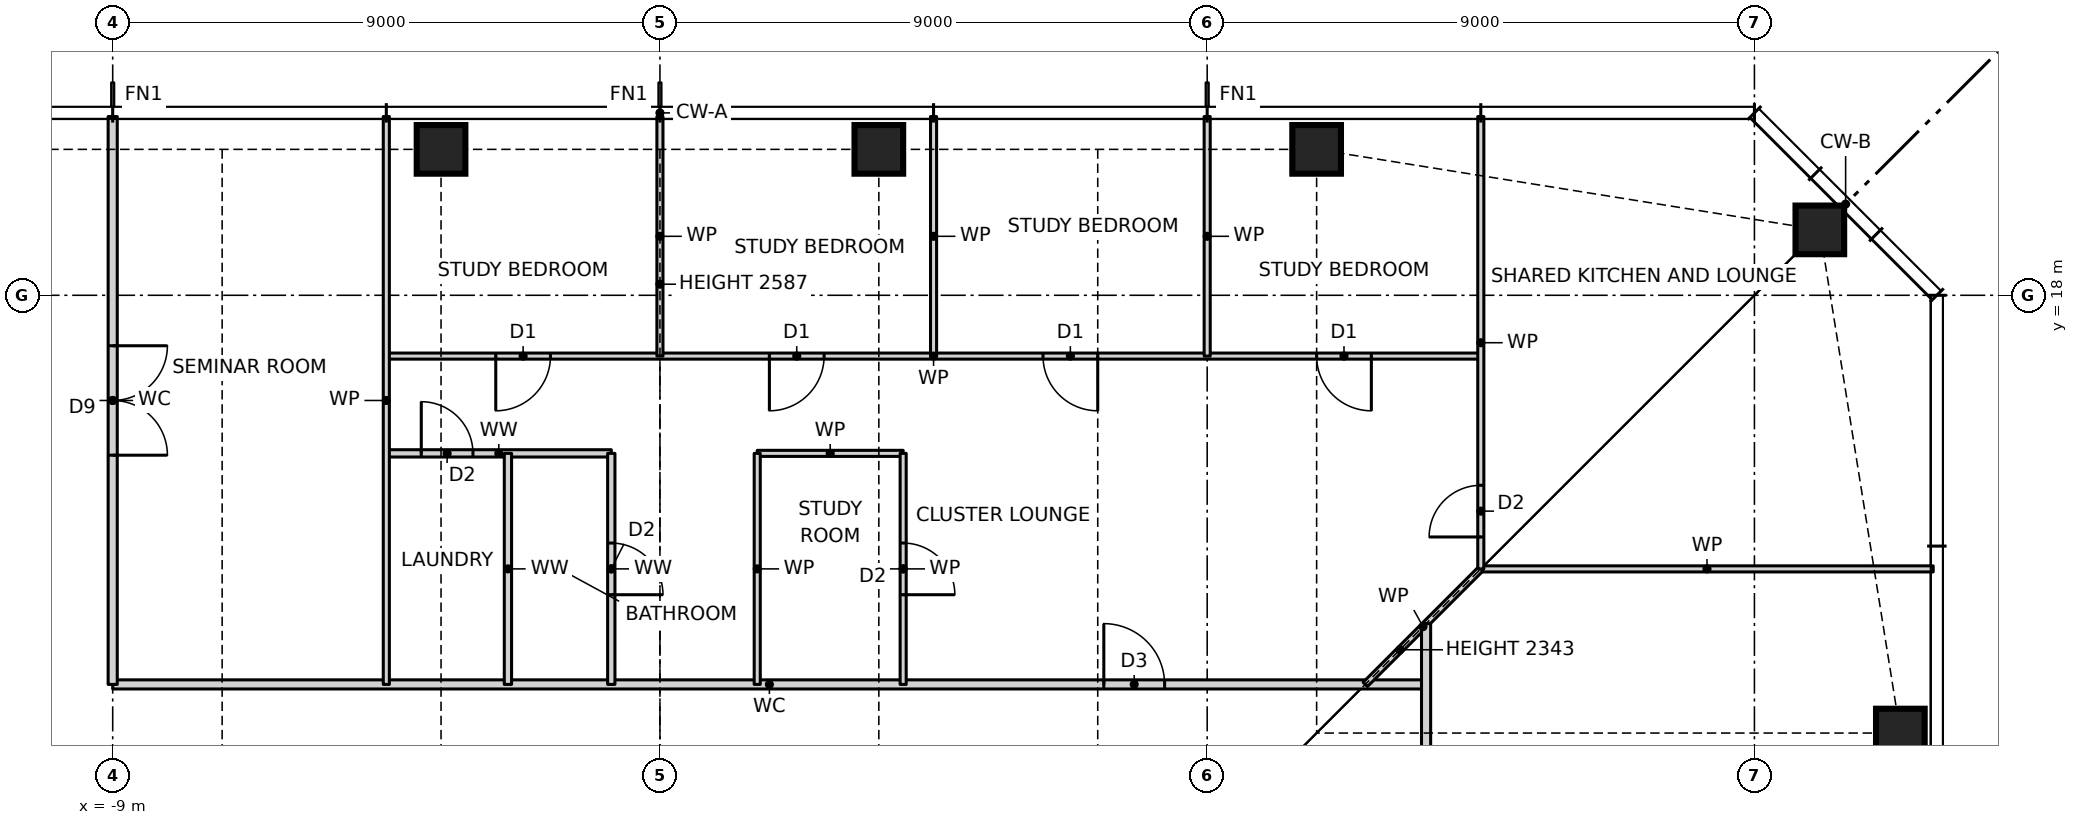
"""IFC4 building model, lengths in metres.
Left out: names, types, materials, properties, quantities, classifications, styles, units other than length and angle.
Written with IfcOpenShell. Run it as: python <this file> out.ifc"""

import sys

from ifc_helpers import new_model, si_unit, direction, frame, frame_2d, origin, origin_2d, place, context, subcontext, project, spatial, rectangle, hollow_rectangle, extrude, element, fill, save


model = new_model("IFC4")
c1 = context("Model", 3, precision=1e-05, world=origin(), true_north=direction((0.0, 1.0)))
c2 = subcontext(c1, "Body", "Model", "MODEL_VIEW")
j1 = project(units=[si_unit("LENGTHUNIT", "METRE"), si_unit("PLANEANGLEUNIT", "RADIAN")], contexts=[c1])
p1 = place(None, origin())
s1 = spatial("IfcSite", under=j1, at=p1, CompositionType="ELEMENT")
p2 = place(p1, origin())
s2 = spatial("IfcBuilding", under=s1, at=p2, CompositionType="ELEMENT")
p3 = place(p2, frame((0.0, 0.0, 98.0)))
s3 = spatial("IfcBuildingStorey", under=s2, at=p3, CompositionType="ELEMENT", Elevation=98.0)
for number, where, z_axis, x_axis in (
    (1, (20.4, 10.8, 0.0), (0.0, 0.0, 1.0), (1.0, 0.0, 0.0)),
    (2, (19.076, 19.076, 0.0), (0.0, 0.0, 1.0), (1.0, 0.0, 0.0)),
    (3, (10.8, 20.4, 0.0), (0.0, 0.0, 1.0), (1.0, 0.0, 0.0)),
    (4, (3.6, 20.4, 0.0), (0.0, 0.0, 1.0), (1.0, 0.0, 0.0)),
    (5, (-3.6, 20.4, 0.0), (0.0, 0.0, 1.0), (1.0, 0.0, 0.0)),
):
    element("IfcColumn", number, at=place(p3, frame(where, z_axis=z_axis, x_axis=x_axis)), inside=s3, PredefinedType="COLUMN", context=c2, shape_type="SweptSolid", body=[
        extrude(hollow_rectangle(XDim=0.8, YDim=0.8, WallThickness=0.07, at=origin_2d()), origin(), (0.0, 0.0, 1.0), 3.5),
    ])
p4 = place(p3, frame((-9.0, 11.6, 0.0), z_axis=(0.0, 0.0, 1.0), x_axis=(1.0, 0.0, 0.0)))
e6 = element("IfcWall", 6, at=p4, inside=s3, PredefinedType="PARTITIONING", context=c2, shape_type="SweptSolid", body=[
    extrude(rectangle(XDim=21.6, YDim=0.15, at=frame_2d((10.8, 0.0))), origin(), (0.0, 0.0, 1.0), 3.27),
])
p5 = place(p4, frame((16.3, 0.0, 0.0)))
e7 = element("IfcOpeningElement", 7, at=p5, cuts=e6, PredefinedType="OPENING", context=c2, shape_type="SweptSolid", body=[
    extrude(rectangle(XDim=1.0, YDim=2.1, at=frame_2d((0.5, 1.05))), frame((0.0, 0.085, 0.0), z_axis=(0.0, -1.0, 0.0), x_axis=(1.0, 0.0, 0.0)), (0.0, 0.0, 1.0), 0.17),
])
p6 = place(p3, frame((13.5, 13.5, 0.0), z_axis=(0.0, 0.0, 1.0), x_axis=(1.0, 0.0, 0.0)))
e8 = element("IfcWall", 8, at=p6, inside=s3, PredefinedType="PARTITIONING", context=c2, shape_type="SweptSolid", body=[
    extrude(rectangle(XDim=7.44, YDim=0.1, at=frame_2d((3.72, 0.0))), origin(), (0.0, 0.0, 1.0), 3.27),
])
p7 = place(p3, frame((-4.5, 15.4, 0.0), z_axis=(0.0, 0.0, 1.0), x_axis=(1.0, 0.0, 0.0)))
e9 = element("IfcWall", 9, at=p7, inside=s3, PredefinedType="PARTITIONING", context=c2, shape_type="SweptSolid", body=[
    extrude(rectangle(XDim=3.7, YDim=0.12, at=frame_2d((1.85, 0.0))), origin(), (0.0, 0.0, 1.0), 3.27),
])
p8 = place(p7, frame((0.575, 0.0, 0.0)))
e10 = element("IfcOpeningElement", 10, at=p8, cuts=e9, PredefinedType="OPENING", context=c2, shape_type="SweptSolid", body=[
    extrude(rectangle(XDim=0.85, YDim=2.1, at=frame_2d((0.425, 1.05))), frame((0.0, 0.07, 0.0), z_axis=(0.0, -1.0, 0.0), x_axis=(1.0, 0.0, 0.0)), (0.0, 0.0, 1.0), 0.14),
])
p9 = place(p3, frame((1.6, 15.4, 0.0), z_axis=(0.0, 0.0, 1.0), x_axis=(1.0, 0.0, 0.0)))
e11 = element("IfcWall", 11, at=p9, inside=s3, PredefinedType="PARTITIONING", context=c2, shape_type="SweptSolid", body=[
    extrude(rectangle(XDim=2.4, YDim=0.1, at=frame_2d((1.2, 0.0))), origin(), (0.0, 0.0, 1.0), 3.27),
])
p10 = place(p3, frame((-4.5, 17.0, 0.0), z_axis=(0.0, 0.0, 1.0), x_axis=(1.0, 0.0, 0.0)))
e12 = element("IfcWall", 12, at=p10, inside=s3, PredefinedType="PARTITIONING", context=c2, shape_type="SweptSolid", body=[
    extrude(rectangle(XDim=18.0, YDim=0.1, at=frame_2d((9.0, 0.0))), origin(), (0.0, 0.0, 1.0), 3.27),
])
p11 = place(p10, frame((15.3, 0.0, 0.0)))
e13 = element("IfcOpeningElement", 13, at=p11, cuts=e12, PredefinedType="OPENING", context=c2, shape_type="SweptSolid", body=[
    extrude(rectangle(XDim=0.9, YDim=2.1, at=frame_2d((0.45, 1.05))), frame((0.0, 0.06, 0.0), z_axis=(0.0, -1.0, 0.0), x_axis=(1.0, 0.0, 0.0)), (0.0, 0.0, 1.0), 0.12),
])
p12 = place(p10, frame((10.8, 0.0, 0.0)))
e14 = element("IfcOpeningElement", 14, at=p12, cuts=e12, PredefinedType="OPENING", context=c2, shape_type="SweptSolid", body=[
    extrude(rectangle(XDim=0.9, YDim=2.1, at=frame_2d((0.45, 1.05))), frame((0.0, 0.06, 0.0), z_axis=(0.0, -1.0, 0.0), x_axis=(1.0, 0.0, 0.0)), (0.0, 0.0, 1.0), 0.12),
])
p13 = place(p10, frame((6.3, 0.0, 0.0)))
e15 = element("IfcOpeningElement", 15, at=p13, cuts=e12, PredefinedType="OPENING", context=c2, shape_type="SweptSolid", body=[
    extrude(rectangle(XDim=0.9, YDim=2.1, at=frame_2d((0.45, 1.05))), frame((0.0, 0.06, 0.0), z_axis=(0.0, -1.0, 0.0), x_axis=(1.0, 0.0, 0.0)), (0.0, 0.0, 1.0), 0.12),
])
p14 = place(p10, frame((1.8, 0.0, 0.0)))
e16 = element("IfcOpeningElement", 16, at=p14, cuts=e12, PredefinedType="OPENING", context=c2, shape_type="SweptSolid", body=[
    extrude(rectangle(XDim=0.9, YDim=2.1, at=frame_2d((0.45, 1.05))), frame((0.0, 0.06, 0.0), z_axis=(0.0, -1.0, 0.0), x_axis=(1.0, 0.0, 0.0)), (0.0, 0.0, 1.0), 0.12),
])
p15 = place(p3, frame((11.6, 11.6, 0.0), z_axis=(0.0, 0.0, 1.0), x_axis=(0.707106781187, 0.707106781187, 0.0)))
e17 = element("IfcWall", 17, at=p15, inside=s3, PredefinedType="PARTITIONING", context=c2, shape_type="SweptSolid", body=[
    extrude(rectangle(XDim=2.687, YDim=0.1, at=frame_2d((1.343, 0.0))), origin(), (0.0, 0.0, 1.0), 2.343),
])
p16 = place(p3, frame((13.5, 13.5, 0.0), z_axis=(0.0, 0.0, 1.0), x_axis=(0.0, 1.0, 0.0)))
e18 = element("IfcWall", 18, at=p16, inside=s3, PredefinedType="PARTITIONING", context=c2, shape_type="SweptSolid", body=[
    extrude(rectangle(XDim=7.44, YDim=0.1, at=frame_2d((3.72, 0.0))), origin(), (0.0, 0.0, 1.0), 3.27),
])
p17 = place(p16, frame((0.525, 0.0, 0.0)))
e19 = element("IfcOpeningElement", 19, at=p17, cuts=e18, PredefinedType="OPENING", context=c2, shape_type="SweptSolid", body=[
    extrude(rectangle(XDim=0.85, YDim=2.1, at=frame_2d((0.425, 1.05))), frame((0.0, 0.06, 0.0), z_axis=(0.0, -1.0, 0.0), x_axis=(1.0, 0.0, 0.0)), (0.0, 0.0, 1.0), 0.12),
])
p18 = place(p3, frame((12.6, -12.6, 0.0), z_axis=(0.0, 0.0, 1.0), x_axis=(0.0, 1.0, 0.0)))
e20 = element("IfcWall", 20, at=p18, inside=s3, PredefinedType="PARTITIONING", context=c2, shape_type="SweptSolid", body=[
    extrude(rectangle(XDim=25.2, YDim=0.15, at=frame_2d((12.6, 0.0))), origin(), (0.0, 0.0, 1.0), 3.27),
])
p19 = place(p18, frame((5.15, 0.0, 0.0)))
e21 = element("IfcOpeningElement", 21, at=p19, cuts=e20, PredefinedType="OPENING", context=c2, shape_type="SweptSolid", body=[
    extrude(rectangle(XDim=1.8, YDim=2.1, at=frame_2d((0.9, 1.05))), frame((0.0, 0.085, 0.0), z_axis=(0.0, -1.0, 0.0), x_axis=(1.0, 0.0, 0.0)), (0.0, 0.0, 1.0), 0.17),
])
p20 = place(p18, frame((11.7, 0.0, 0.0)))
e22 = element("IfcOpeningElement", 22, at=p20, cuts=e20, PredefinedType="OPENING", context=c2, shape_type="SweptSolid", body=[
    extrude(rectangle(XDim=1.8, YDim=2.1, at=frame_2d((0.9, 1.05))), frame((0.0, 0.085, 0.0), z_axis=(0.0, -1.0, 0.0), x_axis=(1.0, 0.0, 0.0)), (0.0, 0.0, 1.0), 0.17),
])
p21 = place(p18, frame((18.25, 0.0, 0.0)))
e23 = element("IfcOpeningElement", 23, at=p21, cuts=e20, PredefinedType="OPENING", context=c2, shape_type="SweptSolid", body=[
    extrude(rectangle(XDim=1.8, YDim=2.1, at=frame_2d((0.9, 1.05))), frame((0.0, 0.085, 0.0), z_axis=(0.0, -1.0, 0.0), x_axis=(1.0, 0.0, 0.0)), (0.0, 0.0, 1.0), 0.17),
])
for number, where, z_axis, x_axis in (
    (24, (9.0, 17.0, 0.0), (0.0, 0.0, 1.0), (0.0, 1.0, 0.0)),
    (25, (4.5, 17.0, 0.0), (0.0, 0.0, 1.0), (0.0, 1.0, 0.0)),
):
    element("IfcWall", number, at=place(p3, frame(where, z_axis=z_axis, x_axis=x_axis)), inside=s3, PredefinedType="PARTITIONING", context=c2, shape_type="SweptSolid", body=[
        extrude(rectangle(XDim=3.94, YDim=0.1, at=frame_2d((1.97, 0.0))), origin(), (0.0, 0.0, 1.0), 3.27),
    ])
p22 = place(p3, frame((4.0, 11.6, 0.0), z_axis=(0.0, 0.0, 1.0), x_axis=(0.0, 1.0, 0.0)))
e26 = element("IfcWall", 26, at=p22, inside=s3, PredefinedType="PARTITIONING", context=c2, shape_type="SweptSolid", body=[
    extrude(rectangle(XDim=3.8, YDim=0.1, at=frame_2d((1.9, 0.0))), origin(), (0.0, 0.0, 1.0), 3.27),
])
p23 = place(p22, frame((1.475, 0.0, 0.0)))
e27 = element("IfcOpeningElement", 27, at=p23, cuts=e26, PredefinedType="OPENING", context=c2, shape_type="SweptSolid", body=[
    extrude(rectangle(XDim=0.85, YDim=2.1, at=frame_2d((0.425, 1.05))), frame((0.0, 0.06, 0.0), z_axis=(0.0, -1.0, 0.0), x_axis=(1.0, 0.0, 0.0)), (0.0, 0.0, 1.0), 0.12),
])
p24 = place(p3, frame((1.6, 11.6, 0.0), z_axis=(0.0, 0.0, 1.0), x_axis=(0.0, 1.0, 0.0)))
e28 = element("IfcWall", 28, at=p24, inside=s3, PredefinedType="PARTITIONING", context=c2, shape_type="SweptSolid", body=[
    extrude(rectangle(XDim=3.8, YDim=0.1, at=frame_2d((1.9, 0.0))), origin(), (0.0, 0.0, 1.0), 3.27),
])
p25 = place(p3, frame((0.0, 17.0, 0.0), z_axis=(0.0, 0.0, 1.0), x_axis=(0.0, 1.0, 0.0)))
e29 = element("IfcWall", 29, at=p25, inside=s3, PredefinedType="PARTITIONING", context=c2, shape_type="SweptSolid", body=[
    extrude(rectangle(XDim=3.94, YDim=0.1, at=frame_2d((1.97, 0.0))), origin(), (0.0, 0.0, 1.0), 2.587),
])
p26 = place(p3, frame((-0.8, 11.6, 0.0), z_axis=(0.0, 0.0, 1.0), x_axis=(0.0, 1.0, 0.0)))
e30 = element("IfcWall", 30, at=p26, inside=s3, PredefinedType="PARTITIONING", context=c2, shape_type="SweptSolid", body=[
    extrude(rectangle(XDim=3.8, YDim=0.12, at=frame_2d((1.9, 0.0))), origin(), (0.0, 0.0, 1.0), 3.27),
])
p27 = place(p26, frame((1.475, 0.0, 0.0)))
e31 = element("IfcOpeningElement", 31, at=p27, cuts=e30, PredefinedType="OPENING", context=c2, shape_type="SweptSolid", body=[
    extrude(rectangle(XDim=0.85, YDim=2.1, at=frame_2d((0.425, 1.05))), frame((0.0, 0.07, 0.0), z_axis=(0.0, -1.0, 0.0), x_axis=(1.0, 0.0, 0.0)), (0.0, 0.0, 1.0), 0.14),
])
p28 = place(p3, frame((-2.5, 11.6, 0.0), z_axis=(0.0, 0.0, 1.0), x_axis=(0.0, 1.0, 0.0)))
e32 = element("IfcWall", 32, at=p28, inside=s3, PredefinedType="PARTITIONING", context=c2, shape_type="SweptSolid", body=[
    extrude(rectangle(XDim=3.8, YDim=0.12, at=frame_2d((1.9, 0.0))), origin(), (0.0, 0.0, 1.0), 3.27),
])
p29 = place(p3, frame((-4.5, 11.6, 0.0), z_axis=(0.0, 0.0, 1.0), x_axis=(0.0, 1.0, 0.0)))
e33 = element("IfcWall", 33, at=p29, inside=s3, PredefinedType="PARTITIONING", context=c2, shape_type="SweptSolid", body=[
    extrude(rectangle(XDim=9.34, YDim=0.1, at=frame_2d((4.67, 0.0))), origin(), (0.0, 0.0, 1.0), 3.27),
])
p30 = place(p3, frame((-9.0, 11.6, 0.0), z_axis=(0.0, 0.0, 1.0), x_axis=(0.0, 1.0, 0.0)))
e34 = element("IfcWall", 34, at=p30, inside=s3, PredefinedType="PARTITIONING", context=c2, shape_type="SweptSolid", body=[
    extrude(rectangle(XDim=9.34, YDim=0.15, at=frame_2d((4.67, 0.0))), origin(), (0.0, 0.0, 1.0), 3.27),
])
p31 = place(p30, frame((3.77, 0.0, 0.0)))
e35 = element("IfcOpeningElement", 35, at=p31, cuts=e34, PredefinedType="OPENING", context=c2, shape_type="SweptSolid", body=[
    extrude(rectangle(XDim=1.8, YDim=2.1, at=frame_2d((0.9, 1.05))), frame((0.0, 0.085, 0.0), z_axis=(0.0, -1.0, 0.0), x_axis=(1.0, 0.0, 0.0)), (0.0, 0.0, 1.0), 0.17),
])
p32 = place(p11, frame((0.9, 0.0, 0.0), z_axis=(0.0, 0.0, 1.0), x_axis=(-1.0, 0.0, 0.0)))
e36 = element("IfcDoor", 36, at=p32, inside=s3, OperationType="SINGLE_SWING_LEFT", PredefinedType="DOOR", context=c2, shape_type="SweptSolid", body=[
    extrude(rectangle(XDim=0.9, YDim=2.1, at=frame_2d((0.45, 1.05))), frame((0.0, 0.025, 0.0), z_axis=(0.0, -1.0, 0.0), x_axis=(1.0, 0.0, 0.0)), (0.0, 0.0, 1.0), 0.05),
])
fill(e13, e36)
p33 = place(p12, frame((0.9, 0.0, 0.0), z_axis=(0.0, 0.0, 1.0), x_axis=(-1.0, 0.0, 0.0)))
e37 = element("IfcDoor", 37, at=p33, inside=s3, OperationType="SINGLE_SWING_LEFT", PredefinedType="DOOR", context=c2, shape_type="SweptSolid", body=[
    extrude(rectangle(XDim=0.9, YDim=2.1, at=frame_2d((0.45, 1.05))), frame((0.0, 0.025, 0.0), z_axis=(0.0, -1.0, 0.0), x_axis=(1.0, 0.0, 0.0)), (0.0, 0.0, 1.0), 0.05),
])
fill(e14, e37)
p34 = place(p13, frame((0.9, 0.0, 0.0), z_axis=(0.0, 0.0, 1.0), x_axis=(-1.0, 0.0, 0.0)))
e38 = element("IfcDoor", 38, at=p34, inside=s3, OperationType="SINGLE_SWING_RIGHT", PredefinedType="DOOR", context=c2, shape_type="SweptSolid", body=[
    extrude(rectangle(XDim=0.9, YDim=2.1, at=frame_2d((0.45, 1.05))), frame((0.0, 0.025, 0.0), z_axis=(0.0, -1.0, 0.0), x_axis=(1.0, 0.0, 0.0)), (0.0, 0.0, 1.0), 0.05),
])
fill(e15, e38)
p35 = place(p14, frame((0.9, 0.0, 0.0), z_axis=(0.0, 0.0, 1.0), x_axis=(-1.0, 0.0, 0.0)))
e39 = element("IfcDoor", 39, at=p35, inside=s3, OperationType="SINGLE_SWING_RIGHT", PredefinedType="DOOR", context=c2, shape_type="SweptSolid", body=[
    extrude(rectangle(XDim=0.9, YDim=2.1, at=frame_2d((0.45, 1.05))), frame((0.0, 0.025, 0.0), z_axis=(0.0, -1.0, 0.0), x_axis=(1.0, 0.0, 0.0)), (0.0, 0.0, 1.0), 0.05),
])
fill(e16, e39)
p36 = place(p5, origin())
e40 = element("IfcDoor", 40, at=p36, inside=s3, OperationType="SINGLE_SWING_LEFT", PredefinedType="DOOR", context=c2, shape_type="SweptSolid", body=[
    extrude(rectangle(XDim=1.0, YDim=2.1, at=frame_2d((0.5, 1.05))), frame((0.0, 0.025, 0.0), z_axis=(0.0, -1.0, 0.0), x_axis=(1.0, 0.0, 0.0)), (0.0, 0.0, 1.0), 0.05),
])
fill(e7, e40)
p37 = place(p23, frame((0.85, 0.0, 0.0), z_axis=(0.0, 0.0, 1.0), x_axis=(-1.0, 0.0, 0.0)))
e41 = element("IfcDoor", 41, at=p37, inside=s3, OperationType="SINGLE_SWING_RIGHT", PredefinedType="DOOR", context=c2, shape_type="SweptSolid", body=[
    extrude(rectangle(XDim=0.85, YDim=2.1, at=frame_2d((0.425, 1.05))), frame((0.0, 0.025, 0.0), z_axis=(0.0, -1.0, 0.0), x_axis=(1.0, 0.0, 0.0)), (0.0, 0.0, 1.0), 0.05),
])
fill(e27, e41)
p38 = place(p27, frame((0.85, 0.0, 0.0), z_axis=(0.0, 0.0, 1.0), x_axis=(-1.0, 0.0, 0.0)))
e42 = element("IfcDoor", 42, at=p38, inside=s3, OperationType="SINGLE_SWING_RIGHT", PredefinedType="DOOR", context=c2, shape_type="SweptSolid", body=[
    extrude(rectangle(XDim=0.85, YDim=2.1, at=frame_2d((0.425, 1.05))), frame((0.0, 0.025, 0.0), z_axis=(0.0, -1.0, 0.0), x_axis=(1.0, 0.0, 0.0)), (0.0, 0.0, 1.0), 0.05),
])
fill(e31, e42)
p39 = place(p8, origin())
e43 = element("IfcDoor", 43, at=p39, inside=s3, OperationType="SINGLE_SWING_LEFT", PredefinedType="DOOR", context=c2, shape_type="SweptSolid", body=[
    extrude(rectangle(XDim=0.85, YDim=2.1, at=frame_2d((0.425, 1.05))), frame((0.0, 0.025, 0.0), z_axis=(0.0, -1.0, 0.0), x_axis=(1.0, 0.0, 0.0)), (0.0, 0.0, 1.0), 0.05),
])
fill(e10, e43)
p40 = place(p31, frame((1.8, 0.0, 0.0), z_axis=(0.0, 0.0, 1.0), x_axis=(-1.0, 0.0, 0.0)))
e44 = element("IfcDoor", 44, at=p40, inside=s3, OperationType="DOUBLE_DOOR_SINGLE_SWING", PredefinedType="DOOR", context=c2, shape_type="SweptSolid", body=[
    extrude(rectangle(XDim=1.8, YDim=2.1, at=frame_2d((0.9, 1.05))), frame((0.0, 0.025, 0.0), z_axis=(0.0, -1.0, 0.0), x_axis=(1.0, 0.0, 0.0)), (0.0, 0.0, 1.0), 0.05),
])
fill(e35, e44)
p41 = place(p17, origin())
e45 = element("IfcDoor", 45, at=p41, inside=s3, OperationType="SINGLE_SWING_LEFT", PredefinedType="DOOR", context=c2, shape_type="SweptSolid", body=[
    extrude(rectangle(XDim=0.85, YDim=2.1, at=frame_2d((0.425, 1.05))), frame((0.0, 0.025, 0.0), z_axis=(0.0, -1.0, 0.0), x_axis=(1.0, 0.0, 0.0)), (0.0, 0.0, 1.0), 0.05),
])
fill(e19, e45)
save(model, sys.argv[1])
